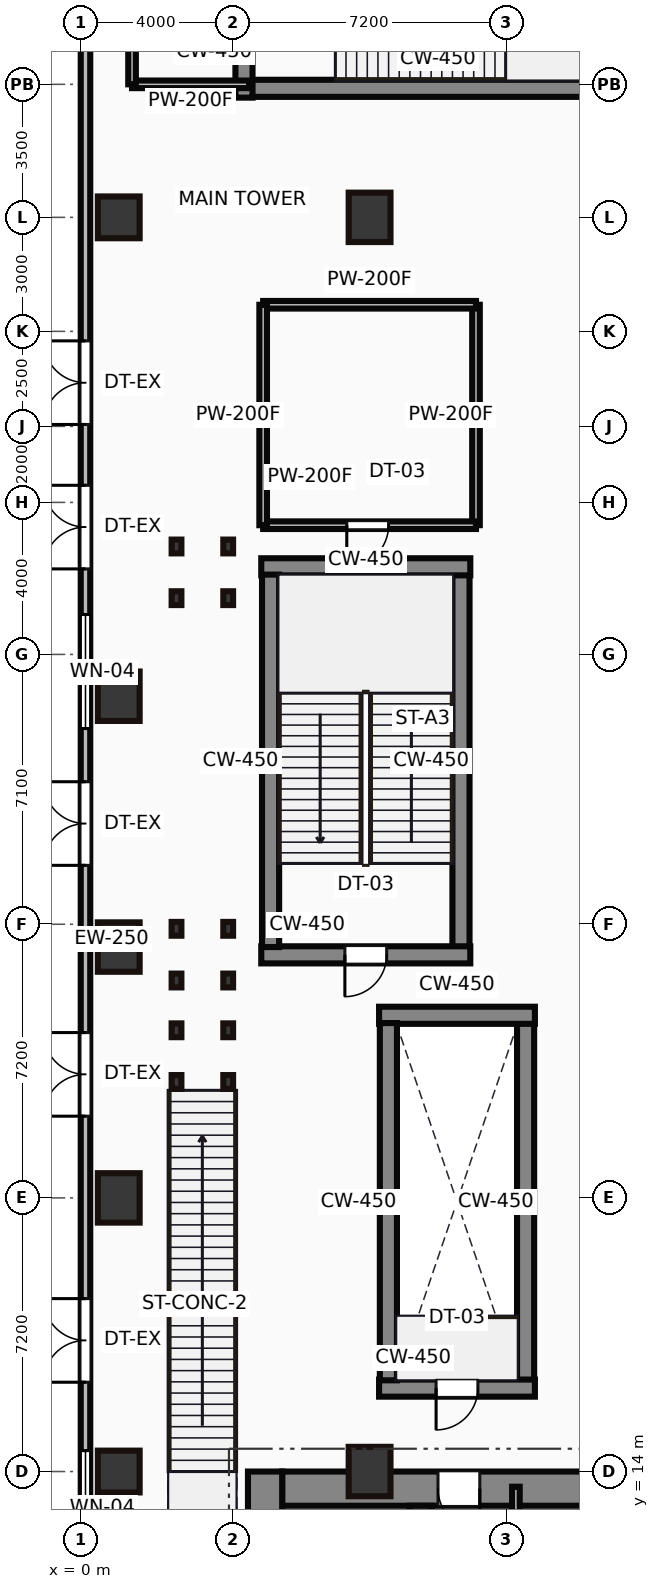
"""IFC4 building model, lengths in metres.
Left out: names, types, materials, properties, quantities, classifications, styles, units other than length and angle.
Written with IfcOpenShell. Run it as: python <this file> out.ifc"""

import sys

from ifc_helpers import new_model, si_unit, direction, frame, frame_2d, origin, origin_2d, place, context, subcontext, project, spatial, rectangle, hollow_rectangle, i_section, extrude, source, transform, mapped, element, fill, save


model = new_model("IFC4")
c1 = context("Model", 3, precision=1e-05, world=origin(), true_north=direction((0.0, 1.0)))
c2 = subcontext(c1, "Body", "Model", "MODEL_VIEW")
j1 = project(units=[si_unit("LENGTHUNIT", "METRE"), si_unit("PLANEANGLEUNIT", "RADIAN")], contexts=[c1])
p1 = place(None, origin())
s1 = spatial("IfcSite", under=j1, at=p1, CompositionType="ELEMENT")
p2 = place(p1, origin())
s2 = spatial("IfcBuilding", under=s1, at=p2, CompositionType="ELEMENT")
p3 = place(p2, origin())
s3 = spatial("IfcBuildingStorey", under=s2, at=p3, CompositionType="ELEMENT", Elevation=0.0)
m1 = source(origin(), c2, "Body", "SweptSolid", [
    extrude(rectangle(XDim=13.1, YDim=0.9, at=frame_2d((6.55, 0.0))), origin(), (0.0, 0.0, 1.0), 6.0),
])
p4 = place(p3, frame((4.85, 0.9, 0.0), z_axis=(0.0, 0.0, 1.0), x_axis=(0.0, 1.0, 0.0)))
e1 = element("IfcWall", 1, at=p4, inside=s3, PredefinedType="SHEAR", context=c2, shape_type="MappedRepresentation", body=[
    mapped(m1, transform((0.0, 0.0, 0.0))),
])
p5 = place(p4, frame((7.65, 0.0, 0.0)))
e2 = element("IfcOpeningElement", 2, at=p5, cuts=e1, PredefinedType="OPENING", context=c2, shape_type="SweptSolid", body=[
    extrude(rectangle(XDim=1.1, YDim=2.15, at=frame_2d((0.55, 1.075))), frame((0.0, 0.46, 0.0), z_axis=(0.0, -1.0, 0.0), x_axis=(1.0, 0.0, 0.0)), (0.0, 0.0, 1.0), 0.92),
])
m2 = source(origin(), c2, "Body", "SweptSolid", [
    extrude(rectangle(XDim=9.1, YDim=0.9, at=frame_2d((4.55, 0.0))), origin(), (0.0, 0.0, 1.0), 6.0),
])
p6 = place(p3, frame((5.3, 13.55, 0.0), z_axis=(0.0, 0.0, 1.0), x_axis=(1.0, 0.0, 0.0)))
e3 = element("IfcWall", 3, at=p6, inside=s3, PredefinedType="SHEAR", context=c2, shape_type="MappedRepresentation", body=[
    mapped(m2, transform((0.0, 0.0, 0.0))),
])
p7 = place(p6, frame((4.1, 0.0, 0.0)))
e4 = element("IfcOpeningElement", 4, at=p7, cuts=e3, PredefinedType="OPENING", context=c2, shape_type="SweptSolid", body=[
    extrude(rectangle(XDim=1.1, YDim=2.15, at=frame_2d((0.55, 1.075))), frame((0.0, 0.46, 0.0), z_axis=(0.0, -1.0, 0.0), x_axis=(1.0, 0.0, 0.0)), (0.0, 0.0, 1.0), 0.92),
])
m3 = source(origin(), c2, "Body", "SweptSolid", [
    extrude(rectangle(XDim=12.2, YDim=0.6, at=frame_2d((6.1, 0.0))), origin(), (0.0, 0.0, 1.0), 6.0),
])
p8 = place(p3, frame((8.94, 0.9, 0.0), z_axis=(0.0, 0.0, 1.0), x_axis=(0.0, 1.0, 0.0)))
e5 = element("IfcWall", 5, at=p8, inside=s3, PredefinedType="SHEAR", context=c2, shape_type="MappedRepresentation", body=[
    mapped(m3, transform((0.0, 0.0, 0.0))),
])
m4 = source(origin(), c2, "Body", "SweptSolid", [
    extrude(hollow_rectangle(XDim=1.1, YDim=1.1, WallThickness=0.05, at=origin_2d()), origin(), (0.0, 0.0, 1.0), 6.0),
])
p9 = place(p3, frame((1.0, 14.0, 0.0), z_axis=(0.0, 0.0, 1.0), x_axis=(1.0, 0.0, 0.0)))
e6 = element("IfcColumn", 6, at=p9, inside=s3, PredefinedType="PILASTER", context=c2, shape_type="MappedRepresentation", body=[
    mapped(m4, transform((0.0, 0.0, 0.0))),
])
m5 = source(origin(), c2, "Body", "SweptSolid", [
    extrude(hollow_rectangle(XDim=1.1, YDim=1.3, WallThickness=0.055, at=origin_2d()), origin(), (0.0, 0.0, 1.0), 6.0),
])
for number, where, z_axis, x_axis in (
    (7, (1.0, 21.2, 0.0), (0.0, 0.0, 1.0), (1.0, 0.0, 0.0)),
    (8, (1.0, 27.8, 0.0), (0.0, 0.0, 1.0), (1.0, 0.0, 0.0)),
    (9, (1.0, 34.4, 0.0), (0.0, 0.0, 1.0), (1.0, 0.0, 0.0)),
):
    element("IfcColumn", number, at=place(p3, frame(where, z_axis=z_axis, x_axis=x_axis)), inside=s3, PredefinedType="PILASTER", context=c2, shape_type="MappedRepresentation", body=[
        mapped(m5, transform((0.0, 0.0, 0.0))),
    ])
p10 = place(p3, frame((1.0, 47.0, 0.0), z_axis=(0.0, 0.0, 1.0), x_axis=(1.0, 0.0, 0.0)))
e10 = element("IfcColumn", 10, at=p10, inside=s3, PredefinedType="PILASTER", context=c2, shape_type="MappedRepresentation", body=[
    mapped(m4, transform((0.0, 0.0, 0.0))),
])
for number, where, z_axis, x_axis in (
    (11, (7.6, 14.0, 0.0), (0.0, 0.0, 1.0), (1.0, 0.0, 0.0)),
    (12, (7.6, 47.0, 0.0), (0.0, 0.0, 1.0), (1.0, 0.0, 0.0)),
):
    element("IfcColumn", number, at=place(p3, frame(where, z_axis=z_axis, x_axis=x_axis)), inside=s3, PredefinedType="PILASTER", context=c2, shape_type="MappedRepresentation", body=[
        mapped(m5, transform((0.0, 0.0, 0.0))),
    ])
m6 = source(origin(), c2, "Body", "SweptSolid", [
    extrude(rectangle(XDim=55.5, YDim=0.25, at=frame_2d((27.75, 0.0))), origin(), (0.0, 0.0, 1.0), 5.7),
])
p11 = place(p3, frame((0.125, 55.75, 0.0), z_axis=(0.0, 0.0, 1.0), x_axis=(0.0, -1.0, 0.0)))
e13 = element("IfcWall", 13, at=p11, inside=s3, PredefinedType="STANDARD", context=c2, shape_type="MappedRepresentation", body=[
    mapped(m6, transform((0.0, 0.0, 0.0))),
])
p12 = place(p11, frame((12.0, 0.0, 0.0)))
e14 = element("IfcOpeningElement", 14, at=p12, cuts=e13, PredefinedType="OPENING", context=c2, shape_type="SweptSolid", body=[
    extrude(rectangle(XDim=2.2, YDim=2.4, at=frame_2d((1.1, 1.2))), frame((0.0, 0.135, 0.0), z_axis=(0.0, -1.0, 0.0), x_axis=(1.0, 0.0, 0.0)), (0.0, 0.0, 1.0), 0.27),
])
p13 = place(p11, frame((15.8, 0.0, 0.0)))
e15 = element("IfcOpeningElement", 15, at=p13, cuts=e13, PredefinedType="OPENING", context=c2, shape_type="SweptSolid", body=[
    extrude(rectangle(XDim=2.2, YDim=2.4, at=frame_2d((1.1, 1.2))), frame((0.0, 0.135, 0.0), z_axis=(0.0, -1.0, 0.0), x_axis=(1.0, 0.0, 0.0)), (0.0, 0.0, 1.0), 0.27),
])
p14 = place(p11, frame((23.6, 0.0, 0.0)))
e16 = element("IfcOpeningElement", 16, at=p14, cuts=e13, PredefinedType="OPENING", context=c2, shape_type="SweptSolid", body=[
    extrude(rectangle(XDim=2.2, YDim=2.4, at=frame_2d((1.1, 1.2))), frame((0.0, 0.135, 0.0), z_axis=(0.0, -1.0, 0.0), x_axis=(1.0, 0.0, 0.0)), (0.0, 0.0, 1.0), 0.27),
])
p15 = place(p11, frame((30.2, 0.0, 0.0)))
e17 = element("IfcOpeningElement", 17, at=p15, cuts=e13, PredefinedType="OPENING", context=c2, shape_type="SweptSolid", body=[
    extrude(rectangle(XDim=2.2, YDim=2.4, at=frame_2d((1.1, 1.2))), frame((0.0, 0.135, 0.0), z_axis=(0.0, -1.0, 0.0), x_axis=(1.0, 0.0, 0.0)), (0.0, 0.0, 1.0), 0.27),
])
p16 = place(p11, frame((37.2, 0.0, 0.0)))
e18 = element("IfcOpeningElement", 18, at=p16, cuts=e13, PredefinedType="OPENING", context=c2, shape_type="SweptSolid", body=[
    extrude(rectangle(XDim=2.2, YDim=2.4, at=frame_2d((1.1, 1.2))), frame((0.0, 0.135, 0.0), z_axis=(0.0, -1.0, 0.0), x_axis=(1.0, 0.0, 0.0)), (0.0, 0.0, 1.0), 0.27),
])
p17 = place(p11, frame((50.0, 0.0, 0.0)))
e19 = element("IfcOpeningElement", 19, at=p17, cuts=e13, PredefinedType="OPENING", context=c2, shape_type="SweptSolid", body=[
    extrude(rectangle(XDim=2.2, YDim=2.4, at=frame_2d((1.1, 1.2))), frame((0.0, 0.135, 0.0), z_axis=(0.0, -1.0, 0.0), x_axis=(1.0, 0.0, 0.0)), (0.0, 0.0, 1.0), 0.27),
])
p18 = place(p11, frame((19.2, 0.0, 0.9)))
e20 = element("IfcOpeningElement", 20, at=p18, cuts=e13, PredefinedType="OPENING", context=c2, shape_type="SweptSolid", body=[
    extrude(rectangle(XDim=3.0, YDim=2.4, at=frame_2d((1.5, 1.2))), frame((0.0, 0.135, 0.0), z_axis=(0.0, -1.0, 0.0), x_axis=(1.0, 0.0, 0.0)), (0.0, 0.0, 1.0), 0.27),
])
p19 = place(p11, frame((41.2, 0.0, 0.9)))
e21 = element("IfcOpeningElement", 21, at=p19, cuts=e13, PredefinedType="OPENING", context=c2, shape_type="SweptSolid", body=[
    extrude(rectangle(XDim=3.0, YDim=2.4, at=frame_2d((1.5, 1.2))), frame((0.0, 0.135, 0.0), z_axis=(0.0, -1.0, 0.0), x_axis=(1.0, 0.0, 0.0)), (0.0, 0.0, 1.0), 0.27),
])
m7 = source(origin(), c2, "Body", "SweptSolid", [
    extrude(rectangle(XDim=5.5, YDim=0.45, at=frame_2d((2.75, 0.0))), origin(), (0.0, 0.0, 1.0), 6.0),
])
p20 = place(p3, frame((4.75, 27.595, 0.0), z_axis=(0.0, 0.0, 1.0), x_axis=(1.0, 0.0, 0.0)))
e22 = element("IfcWall", 22, at=p20, inside=s3, PredefinedType="SHEAR", context=c2, shape_type="MappedRepresentation", body=[
    mapped(m7, transform((0.0, 0.0, 0.0))),
])
p21 = place(p20, frame((2.2, 0.0, 0.0)))
e23 = element("IfcOpeningElement", 23, at=p21, cuts=e22, PredefinedType="OPENING", context=c2, shape_type="SweptSolid", body=[
    extrude(rectangle(XDim=1.1, YDim=2.15, at=frame_2d((0.55, 1.075))), frame((0.0, 0.235, 0.0), z_axis=(0.0, -1.0, 0.0), x_axis=(1.0, 0.0, 0.0)), (0.0, 0.0, 1.0), 0.47),
])
m8 = source(origin(), c2, "Body", "SweptSolid", [
    extrude(rectangle(XDim=9.8, YDim=0.45, at=frame_2d((4.9, 0.0))), origin(), (0.0, 0.0, 1.0), 6.0),
])
for number, where, z_axis, x_axis in (
    (24, (4.995, 27.8, 0.0), (0.0, 0.0, 1.0), (0.0, 1.0, 0.0)),
    (25, (10.005, 27.8, 0.0), (0.0, 0.0, 1.0), (0.0, 1.0, 0.0)),
):
    element("IfcWall", number, at=place(p3, frame(where, z_axis=z_axis, x_axis=x_axis)), inside=s3, PredefinedType="SHEAR", context=c2, shape_type="MappedRepresentation", body=[
        mapped(m8, transform((0.0, 0.0, 0.0))),
    ])
p22 = place(p3, frame((4.75, 37.805, 0.0), z_axis=(0.0, 0.0, 1.0), x_axis=(1.0, 0.0, 0.0)))
e26 = element("IfcWall", 26, at=p22, inside=s3, PredefinedType="SHEAR", context=c2, shape_type="MappedRepresentation", body=[
    mapped(m7, transform((0.0, 0.0, 0.0))),
])
p23 = place(p3, frame((4.295, 50.15, 0.0), z_axis=(0.0, 0.0, 1.0), x_axis=(0.0, 1.0, 0.0)))
e27 = element("IfcWall", 27, at=p23, inside=s3, PredefinedType="SHEAR", context=c2, shape_type="MappedRepresentation", body=[
    mapped(m7, transform((0.0, 0.0, 0.0))),
])
p24 = place(p23, frame((2.2, 0.0, 0.0)))
e28 = element("IfcOpeningElement", 28, at=p24, cuts=e27, PredefinedType="OPENING", context=c2, shape_type="SweptSolid", body=[
    extrude(rectangle(XDim=1.1, YDim=2.15, at=frame_2d((0.55, 1.075))), frame((0.0, 0.235, 0.0), z_axis=(0.0, -1.0, 0.0), x_axis=(1.0, 0.0, 0.0)), (0.0, 0.0, 1.0), 0.47),
])
p25 = place(p3, frame((4.5, 50.395, 0.0), z_axis=(0.0, 0.0, 1.0), x_axis=(1.0, 0.0, 0.0)))
e29 = element("IfcWall", 29, at=p25, inside=s3, PredefinedType="SHEAR", context=c2, shape_type="MappedRepresentation", body=[
    mapped(m8, transform((0.0, 0.0, 0.0))),
])
m9 = source(origin(), c2, "Body", "SweptSolid", [
    extrude(rectangle(XDim=4.1, YDim=0.45, at=frame_2d((2.05, 0.0))), origin(), (0.0, 0.0, 1.0), 5.7),
])
p26 = place(p3, frame((7.85, 16.195, 0.0), z_axis=(0.0, 0.0, 1.0), x_axis=(1.0, 0.0, 0.0)))
e30 = element("IfcWall", 30, at=p26, inside=s3, PredefinedType="SHEAR", context=c2, shape_type="MappedRepresentation", body=[
    mapped(m9, transform((0.0, 0.0, 0.0))),
])
p27 = place(p26, frame((1.5, 0.0, 0.0)))
e31 = element("IfcOpeningElement", 31, at=p27, cuts=e30, PredefinedType="OPENING", context=c2, shape_type="SweptSolid", body=[
    extrude(rectangle(XDim=1.1, YDim=2.15, at=frame_2d((0.55, 1.075))), frame((0.0, 0.235, 0.0), z_axis=(0.0, -1.0, 0.0), x_axis=(1.0, 0.0, 0.0)), (0.0, 0.0, 1.0), 0.47),
])
m10 = source(origin(), c2, "Body", "SweptSolid", [
    extrude(rectangle(XDim=9.4, YDim=0.45, at=frame_2d((4.7, 0.0))), origin(), (0.0, 0.0, 1.0), 5.7),
])
for number, where, z_axis, x_axis in (
    (32, (8.095, 16.4, 0.0), (0.0, 0.0, 1.0), (0.0, 1.0, 0.0)),
    (33, (11.705, 16.4, 0.0), (0.0, 0.0, 1.0), (0.0, 1.0, 0.0)),
):
    element("IfcWall", number, at=place(p3, frame(where, z_axis=z_axis, x_axis=x_axis)), inside=s3, PredefinedType="SHEAR", context=c2, shape_type="MappedRepresentation", body=[
        mapped(m10, transform((0.0, 0.0, 0.0))),
    ])
p28 = place(p3, frame((7.85, 26.005, 0.0), z_axis=(0.0, 0.0, 1.0), x_axis=(1.0, 0.0, 0.0)))
e34 = element("IfcWall", 34, at=p28, inside=s3, PredefinedType="SHEAR", context=c2, shape_type="MappedRepresentation", body=[
    mapped(m9, transform((0.0, 0.0, 0.0))),
])
m11 = source(origin(), c2, "Body", "SweptSolid", [
    extrude(i_section(OverallWidth=0.257, OverallDepth=0.363, WebThickness=0.013, FlangeThickness=0.022, at=origin_2d()), origin(), (0.0, 0.0, 1.0), 5.8),
])
for number, where, z_axis, x_axis in (
    (35, (2.52, 24.25, 0.0), (0.0, 0.0, 1.0), (1.0, 0.0, 0.0)),
    (36, (2.52, 25.61, 0.0), (0.0, 0.0, 1.0), (1.0, 0.0, 0.0)),
    (37, (3.88, 24.25, 0.0), (0.0, 0.0, 1.0), (1.0, 0.0, 0.0)),
    (38, (3.88, 25.61, 0.0), (0.0, 0.0, 1.0), (1.0, 0.0, 0.0)),
    (39, (2.52, 26.92, 0.0), (0.0, 0.0, 1.0), (1.0, 0.0, 0.0)),
    (40, (2.52, 28.28, 0.0), (0.0, 0.0, 1.0), (1.0, 0.0, 0.0)),
    (41, (3.88, 26.92, 0.0), (0.0, 0.0, 1.0), (1.0, 0.0, 0.0)),
    (42, (3.88, 28.28, 0.0), (0.0, 0.0, 1.0), (1.0, 0.0, 0.0)),
):
    element("IfcColumn", number, at=place(p3, frame(where, z_axis=z_axis, x_axis=x_axis)), inside=s3, PredefinedType="COLUMN", context=c2, shape_type="MappedRepresentation", body=[
        mapped(m11, transform((0.0, 0.0, 0.0))),
    ])
m12 = source(origin(), c2, "Body", "SweptSolid", [
    extrude(i_section(OverallWidth=0.257, OverallDepth=0.363, WebThickness=0.013, FlangeThickness=0.022, at=origin_2d()), origin(), (0.0, 0.0, 1.0), 6.0),
])
for number, where, z_axis, x_axis in (
    (43, (2.52, 36.98, 0.0), (0.0, 0.0, 1.0), (1.0, 0.0, 0.0)),
    (44, (2.52, 38.34, 0.0), (0.0, 0.0, 1.0), (1.0, 0.0, 0.0)),
    (45, (3.88, 36.98, 0.0), (0.0, 0.0, 1.0), (1.0, 0.0, 0.0)),
    (46, (3.88, 38.34, 0.0), (0.0, 0.0, 1.0), (1.0, 0.0, 0.0)),
):
    element("IfcColumn", number, at=place(p3, frame(where, z_axis=z_axis, x_axis=x_axis)), inside=s3, PredefinedType="COLUMN", context=c2, shape_type="MappedRepresentation", body=[
        mapped(m12, transform((0.0, 0.0, 0.0))),
    ])
m13 = source(origin(), c2, "Body", "SweptSolid", [
    extrude(rectangle(XDim=3.18, YDim=0.2, at=frame_2d((1.59, 0.0))), origin(), (0.0, 0.0, 1.0), 5.7),
])
p29 = place(p3, frame((11.45, 10.42, 0.0), z_axis=(0.0, 0.0, 1.0), x_axis=(0.0, 1.0, 0.0)))
e47 = element("IfcWall", 47, at=p29, inside=s3, PredefinedType="PARTITIONING", context=c2, shape_type="MappedRepresentation", body=[
    mapped(m13, transform((0.0, 0.0, 0.0))),
])
m14 = source(origin(), c2, "Body", "SweptSolid", [
    extrude(rectangle(XDim=5.3, YDim=0.2, at=frame_2d((2.65, 0.0))), origin(), (0.0, 0.0, 1.0), 5.7),
])
p30 = place(p3, frame((1.35, 50.5, 0.0), z_axis=(0.0, 0.0, 1.0), x_axis=(0.0, 1.0, 0.0)))
e48 = element("IfcWall", 48, at=p30, inside=s3, PredefinedType="PARTITIONING", context=c2, shape_type="MappedRepresentation", body=[
    mapped(m14, transform((0.0, 0.0, 0.0))),
])
m15 = source(origin(), c2, "Body", "SweptSolid", [
    extrude(rectangle(XDim=3.08, YDim=0.2, at=frame_2d((1.54, 0.0))), origin(), (0.0, 0.0, 1.0), 5.7),
])
p31 = place(p3, frame((1.35, 50.5, 0.0), z_axis=(0.0, 0.0, 1.0), x_axis=(1.0, 0.0, 0.0)))
e49 = element("IfcWall", 49, at=p31, inside=s3, PredefinedType="PARTITIONING", context=c2, shape_type="MappedRepresentation", body=[
    mapped(m15, transform((0.0, 0.0, 0.0))),
])
m16 = source(origin(), c2, "Body", "SweptSolid", [
    extrude(rectangle(XDim=5.6, YDim=0.2, at=frame_2d((2.8, 0.0))), origin(), (0.0, 0.0, 1.0), 5.7),
])
p32 = place(p3, frame((4.8, 38.9, 0.0), z_axis=(0.0, 0.0, 1.0), x_axis=(1.0, 0.0, 0.0)))
e50 = element("IfcWall", 50, at=p32, inside=s3, PredefinedType="PARTITIONING", context=c2, shape_type="MappedRepresentation", body=[
    mapped(m16, transform((0.0, 0.0, 0.0))),
])
p33 = place(p32, frame((2.2, 0.0, 0.0)))
e51 = element("IfcOpeningElement", 51, at=p33, cuts=e50, PredefinedType="OPENING", context=c2, shape_type="SweptSolid", body=[
    extrude(rectangle(XDim=1.1, YDim=2.15, at=frame_2d((0.55, 1.075))), frame((0.0, 0.11, 0.0), z_axis=(0.0, -1.0, 0.0), x_axis=(1.0, 0.0, 0.0)), (0.0, 0.0, 1.0), 0.22),
])
m17 = source(origin(), c2, "Body", "SweptSolid", [
    extrude(rectangle(XDim=5.8, YDim=0.2, at=frame_2d((2.9, 0.0))), origin(), (0.0, 0.0, 1.0), 5.7),
])
p34 = place(p3, frame((10.4, 38.9, 0.0), z_axis=(0.0, 0.0, 1.0), x_axis=(0.0, 1.0, 0.0)))
e52 = element("IfcWall", 52, at=p34, inside=s3, PredefinedType="PARTITIONING", context=c2, shape_type="MappedRepresentation", body=[
    mapped(m17, transform((0.0, 0.0, 0.0))),
])
p35 = place(p3, frame((4.8, 44.7, 0.0), z_axis=(0.0, 0.0, 1.0), x_axis=(1.0, 0.0, 0.0)))
e53 = element("IfcWall", 53, at=p35, inside=s3, PredefinedType="PARTITIONING", context=c2, shape_type="MappedRepresentation", body=[
    mapped(m16, transform((0.0, 0.0, 0.0))),
])
p36 = place(p3, frame((4.8, 38.9, 0.0), z_axis=(0.0, 0.0, 1.0), x_axis=(0.0, 1.0, 0.0)))
e54 = element("IfcWall", 54, at=p36, inside=s3, PredefinedType="PARTITIONING", context=c2, shape_type="MappedRepresentation", body=[
    mapped(m17, transform((0.0, 0.0, 0.0))),
])
m18 = source(origin(), c2, "Body", "SweptSolid", [
    extrude(rectangle(XDim=2.2, YDim=2.4, at=frame_2d((1.1, 1.2))), frame((0.0, 0.025, 0.0), z_axis=(0.0, -1.0, 0.0), x_axis=(1.0, 0.0, 0.0)), (0.0, 0.0, 1.0), 0.05),
])
p37 = place(p12, frame((2.2, 0.0, 0.0), z_axis=(0.0, 0.0, 1.0), x_axis=(-1.0, 0.0, 0.0)))
e55 = element("IfcDoor", 55, at=p37, inside=s3, OperationType="DOUBLE_DOOR_SINGLE_SWING", PredefinedType="DOOR", context=c2, shape_type="MappedRepresentation", body=[
    mapped(m18, transform((0.0, 0.0, 0.0))),
])
fill(e14, e55)
p38 = place(p13, frame((2.2, 0.0, 0.0), z_axis=(0.0, 0.0, 1.0), x_axis=(-1.0, 0.0, 0.0)))
e56 = element("IfcDoor", 56, at=p38, inside=s3, OperationType="DOUBLE_DOOR_SINGLE_SWING", PredefinedType="DOOR", context=c2, shape_type="MappedRepresentation", body=[
    mapped(m18, transform((0.0, 0.0, 0.0))),
])
fill(e15, e56)
p39 = place(p14, frame((2.2, 0.0, 0.0), z_axis=(0.0, 0.0, 1.0), x_axis=(-1.0, 0.0, 0.0)))
e57 = element("IfcDoor", 57, at=p39, inside=s3, OperationType="DOUBLE_DOOR_SINGLE_SWING", PredefinedType="DOOR", context=c2, shape_type="MappedRepresentation", body=[
    mapped(m18, transform((0.0, 0.0, 0.0))),
])
fill(e16, e57)
p40 = place(p15, frame((2.2, 0.0, 0.0), z_axis=(0.0, 0.0, 1.0), x_axis=(-1.0, 0.0, 0.0)))
e58 = element("IfcDoor", 58, at=p40, inside=s3, OperationType="DOUBLE_DOOR_SINGLE_SWING", PredefinedType="DOOR", context=c2, shape_type="MappedRepresentation", body=[
    mapped(m18, transform((0.0, 0.0, 0.0))),
])
fill(e17, e58)
p41 = place(p16, frame((2.2, 0.0, 0.0), z_axis=(0.0, 0.0, 1.0), x_axis=(-1.0, 0.0, 0.0)))
e59 = element("IfcDoor", 59, at=p41, inside=s3, OperationType="DOUBLE_DOOR_SINGLE_SWING", PredefinedType="DOOR", context=c2, shape_type="MappedRepresentation", body=[
    mapped(m18, transform((0.0, 0.0, 0.0))),
])
fill(e18, e59)
m19 = source(origin(), c2, "Body", "SweptSolid", [
    extrude(rectangle(XDim=3.0, YDim=2.4, at=frame_2d((1.5, 1.2))), frame((0.0, 0.03, 0.0), z_axis=(0.0, -1.0, 0.0), x_axis=(1.0, 0.0, 0.0)), (0.0, 0.0, 1.0), 0.06),
])
p42 = place(p18, origin())
e60 = element("IfcWindow", 60, at=p42, inside=s3, PartitioningType="SINGLE_PANEL", PredefinedType="WINDOW", context=c2, shape_type="MappedRepresentation", body=[
    mapped(m19, transform((0.0, 0.0, 0.0))),
])
fill(e20, e60)
p43 = place(p19, origin())
e61 = element("IfcWindow", 61, at=p43, inside=s3, PartitioningType="SINGLE_PANEL", PredefinedType="WINDOW", context=c2, shape_type="MappedRepresentation", body=[
    mapped(m19, transform((0.0, 0.0, 0.0))),
])
fill(e21, e61)
m20 = source(origin(), c2, "Body", "SweptSolid", [
    extrude(rectangle(XDim=1.1, YDim=2.15, at=frame_2d((0.55, 1.075))), frame((0.0, 0.025, 0.0), z_axis=(0.0, -1.0, 0.0), x_axis=(1.0, 0.0, 0.0)), (0.0, 0.0, 1.0), 0.05),
])
p44 = place(p7, origin())
e62 = element("IfcDoor", 62, at=p44, inside=s3, OperationType="SINGLE_SWING_RIGHT", PredefinedType="DOOR", context=c2, shape_type="MappedRepresentation", body=[
    mapped(m20, transform((0.0, 0.0, 0.0))),
])
fill(e4, e62)
p45 = place(p33, origin())
e63 = element("IfcDoor", 63, at=p45, inside=s3, OperationType="SINGLE_SWING_LEFT", PredefinedType="DOOR", context=c2, shape_type="MappedRepresentation", body=[
    mapped(m20, transform((0.0, 0.0, 0.0))),
])
fill(e51, e63)
p46 = place(p21, frame((1.1, 0.0, 0.0), z_axis=(0.0, 0.0, 1.0), x_axis=(-1.0, 0.0, 0.0)))
e64 = element("IfcDoor", 64, at=p46, inside=s3, OperationType="SINGLE_SWING_LEFT", PredefinedType="DOOR", context=c2, shape_type="MappedRepresentation", body=[
    mapped(m20, transform((0.0, 0.0, 0.0))),
])
fill(e23, e64)
p47 = place(p27, frame((1.1, 0.0, 0.0), z_axis=(0.0, 0.0, 1.0), x_axis=(-1.0, 0.0, 0.0)))
e65 = element("IfcDoor", 65, at=p47, inside=s3, OperationType="SINGLE_SWING_LEFT", PredefinedType="DOOR", context=c2, shape_type="MappedRepresentation", body=[
    mapped(m20, transform((0.0, 0.0, 0.0))),
])
fill(e31, e65)
save(model, sys.argv[1])
